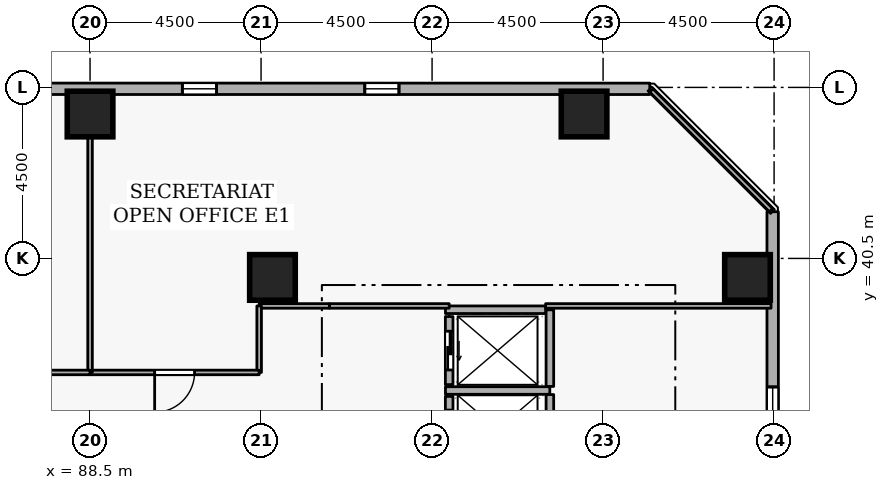
"""IFC4 building model, lengths in metres.
Left out: names, types, materials, properties, quantities, classifications, styles, units other than length and angle.
Written with IfcOpenShell. Run it as: python <this file> out.ifc"""

import sys

from ifc_helpers import new_model, si_unit, direction, frame, frame_2d, origin, origin_2d, place, context, subcontext, project, spatial, rectangle, extrude, element, fill, save


model = new_model("IFC4")
c1 = context("Model", 3, precision=1e-05, world=origin(), true_north=direction((0.0, 1.0)))
c2 = subcontext(c1, "Body", "Model", "MODEL_VIEW")
j1 = project(units=[si_unit("LENGTHUNIT", "METRE"), si_unit("PLANEANGLEUNIT", "RADIAN")], contexts=[c1])
p1 = place(None, origin())
s1 = spatial("IfcSite", under=j1, at=p1, CompositionType="ELEMENT")
p2 = place(p1, origin())
s2 = spatial("IfcBuilding", under=s1, at=p2, CompositionType="ELEMENT")
p3 = place(p2, frame((0.0, 0.0, 108.9)))
s3 = spatial("IfcBuildingStorey", under=s2, at=p3, CompositionType="ELEMENT", Elevation=108.9)
for number, where, z_axis, x_axis in (
    (1, (105.8, 40.0, 0.0), (0.0, 0.0, 1.0), (1.0, 0.0, 0.0)),
    (2, (101.5, 44.3, 0.0), (0.0, 0.0, 1.0), (1.0, 0.0, 0.0)),
    (3, (88.5, 44.3, 0.0), (0.0, 0.0, 1.0), (1.0, 0.0, 0.0)),
    (4, (93.3, 40.0, 0.0), (0.0, 0.0, 1.0), (1.0, 0.0, 0.0)),
):
    element("IfcColumn", number, at=place(p3, frame(where, z_axis=z_axis, x_axis=x_axis)), inside=s3, PredefinedType="COLUMN", context=c2, shape_type="SweptSolid", body=[
        extrude(rectangle(XDim=1.2, YDim=1.2, at=origin_2d()), origin(), (0.0, 0.0, 1.0), 3.6),
    ])
p4 = place(p3, frame((106.465, 5.619, 0.0), z_axis=(0.0, 0.0, 1.0), x_axis=(-5.4088042e-05, 0.999999998537, 0.0)))
e5 = element("IfcWall", 5, at=p4, inside=s3, PredefinedType="STANDARD", context=c2, shape_type="SweptSolid", body=[
    extrude(rectangle(XDim=36.11, YDim=0.3, at=frame_2d((18.055, 0.0))), origin(), (0.0, 0.0, 1.0), 2.7),
])
p5 = place(p4, frame((1.8, 0.0, 0.72)))
e6 = element("IfcOpeningElement", 6, at=p5, cuts=e5, PredefinedType="OPENING", context=c2, shape_type="SweptSolid", body=[
    extrude(rectangle(XDim=0.9, YDim=1.75, at=frame_2d((0.45, 0.875))), frame((0.0, 0.16, 0.0), z_axis=(0.0, -1.0, 0.0), x_axis=(1.0, 0.0, 0.0)), (0.0, 0.0, 1.0), 0.32),
])
p6 = place(p4, frame((11.4, 0.0, 0.72)))
e7 = element("IfcOpeningElement", 7, at=p6, cuts=e5, PredefinedType="OPENING", context=c2, shape_type="SweptSolid", body=[
    extrude(rectangle(XDim=0.9, YDim=1.75, at=frame_2d((0.45, 0.875))), frame((0.0, 0.16, 0.0), z_axis=(0.0, -1.0, 0.0), x_axis=(1.0, 0.0, 0.0)), (0.0, 0.0, 1.0), 0.32),
])
p7 = place(p4, frame((16.2, 0.0, 0.72)))
e8 = element("IfcOpeningElement", 8, at=p7, cuts=e5, PredefinedType="OPENING", context=c2, shape_type="SweptSolid", body=[
    extrude(rectangle(XDim=0.9, YDim=1.75, at=frame_2d((0.45, 0.875))), frame((0.0, 0.16, 0.0), z_axis=(0.0, -1.0, 0.0), x_axis=(1.0, 0.0, 0.0)), (0.0, 0.0, 1.0), 0.32),
])
p8 = place(p4, frame((25.8, 0.0, 0.72)))
e9 = element("IfcOpeningElement", 9, at=p8, cuts=e5, PredefinedType="OPENING", context=c2, shape_type="SweptSolid", body=[
    extrude(rectangle(XDim=0.9, YDim=1.75, at=frame_2d((0.45, 0.875))), frame((0.0, 0.16, 0.0), z_axis=(0.0, -1.0, 0.0), x_axis=(1.0, 0.0, 0.0)), (0.0, 0.0, 1.0), 0.32),
])
p9 = place(p4, frame((30.6, 0.0, 0.72)))
e10 = element("IfcOpeningElement", 10, at=p9, cuts=e5, PredefinedType="OPENING", context=c2, shape_type="SweptSolid", body=[
    extrude(rectangle(XDim=0.9, YDim=1.75, at=frame_2d((0.45, 0.875))), frame((0.0, 0.16, 0.0), z_axis=(0.0, -1.0, 0.0), x_axis=(1.0, 0.0, 0.0)), (0.0, 0.0, 1.0), 0.32),
])
p10 = place(p3, frame((103.229, 44.963, 0.0), z_axis=(0.0, 0.0, 1.0), x_axis=(-0.999999998537, 5.4088042e-05, 0.0)))
e11 = element("IfcWall", 11, at=p10, inside=s3, PredefinedType="STANDARD", context=c2, shape_type="SweptSolid", body=[
    extrude(rectangle(XDim=36.11, YDim=0.3, at=frame_2d((18.055, 0.0))), origin(), (0.0, 0.0, 1.0), 2.7),
])
p11 = place(p10, frame((6.6, 0.0, 0.72)))
e12 = element("IfcOpeningElement", 12, at=p11, cuts=e11, PredefinedType="OPENING", context=c2, shape_type="SweptSolid", body=[
    extrude(rectangle(XDim=0.9, YDim=1.75, at=frame_2d((0.45, 0.875))), frame((0.0, 0.16, 0.0), z_axis=(0.0, -1.0, 0.0), x_axis=(1.0, 0.0, 0.0)), (0.0, 0.0, 1.0), 0.32),
])
p12 = place(p10, frame((11.4, 0.0, 0.72)))
e13 = element("IfcOpeningElement", 13, at=p12, cuts=e11, PredefinedType="OPENING", context=c2, shape_type="SweptSolid", body=[
    extrude(rectangle(XDim=0.9, YDim=1.75, at=frame_2d((0.45, 0.875))), frame((0.0, 0.16, 0.0), z_axis=(0.0, -1.0, 0.0), x_axis=(1.0, 0.0, 0.0)), (0.0, 0.0, 1.0), 0.32),
])
p13 = place(p10, frame((16.2, 0.0, 0.72)))
e14 = element("IfcOpeningElement", 14, at=p13, cuts=e11, PredefinedType="OPENING", context=c2, shape_type="SweptSolid", body=[
    extrude(rectangle(XDim=0.9, YDim=1.75, at=frame_2d((0.45, 0.875))), frame((0.0, 0.16, 0.0), z_axis=(0.0, -1.0, 0.0), x_axis=(1.0, 0.0, 0.0)), (0.0, 0.0, 1.0), 0.32),
])
p14 = place(p10, frame((21.0, 0.0, 0.72)))
e15 = element("IfcOpeningElement", 15, at=p14, cuts=e11, PredefinedType="OPENING", context=c2, shape_type="SweptSolid", body=[
    extrude(rectangle(XDim=0.9, YDim=1.75, at=frame_2d((0.45, 0.875))), frame((0.0, 0.16, 0.0), z_axis=(0.0, -1.0, 0.0), x_axis=(1.0, 0.0, 0.0)), (0.0, 0.0, 1.0), 0.32),
])
p15 = place(p10, frame((30.6, 0.0, 0.72)))
e16 = element("IfcOpeningElement", 16, at=p15, cuts=e11, PredefinedType="OPENING", context=c2, shape_type="SweptSolid", body=[
    extrude(rectangle(XDim=0.9, YDim=1.75, at=frame_2d((0.45, 0.875))), frame((0.0, 0.16, 0.0), z_axis=(0.0, -1.0, 0.0), x_axis=(1.0, 0.0, 0.0)), (0.0, 0.0, 1.0), 0.32),
])
p16 = place(p3, frame((97.95, 36.87, 0.0), z_axis=(0.0, 0.0, 1.0), x_axis=(0.0, -1.0, 0.0)))
e17 = element("IfcWall", 17, at=p16, inside=s3, PredefinedType="STANDARD", context=c2, shape_type="SweptSolid", body=[
    extrude(rectangle(XDim=1.74, YDim=0.2, at=frame_2d((0.87, 0.0))), origin(), (0.0, 0.0, 1.0), 3.34),
])
p17 = place(p16, frame((0.36, 0.0, 0.0)))
e18 = element("IfcOpeningElement", 18, at=p17, cuts=e17, PredefinedType="OPENING", context=c2, shape_type="SweptSolid", body=[
    extrude(rectangle(XDim=1.02, YDim=2.06, at=frame_2d((0.51, 1.03))), frame((0.0, 0.11, 0.0), z_axis=(0.0, -1.0, 0.0), x_axis=(1.0, 0.0, 0.0)), (0.0, 0.0, 1.0), 0.22),
])
p18 = place(p3, frame((97.95, 38.97, 0.0), z_axis=(0.0, 0.0, 1.0), x_axis=(0.0, -1.0, 0.0)))
e19 = element("IfcWall", 19, at=p18, inside=s3, PredefinedType="STANDARD", context=c2, shape_type="SweptSolid", body=[
    extrude(rectangle(XDim=1.79, YDim=0.2, at=frame_2d((0.895, 0.0))), origin(), (0.0, 0.0, 1.0), 3.34),
])
p19 = place(p18, frame((0.385, 0.0, 0.0)))
e20 = element("IfcOpeningElement", 20, at=p19, cuts=e19, PredefinedType="OPENING", context=c2, shape_type="SweptSolid", body=[
    extrude(rectangle(XDim=1.02, YDim=2.06, at=frame_2d((0.51, 1.03))), frame((0.0, 0.11, 0.0), z_axis=(0.0, -1.0, 0.0), x_axis=(1.0, 0.0, 0.0)), (0.0, 0.0, 1.0), 0.22),
])
p20 = place(p3, frame((97.852, 37.025, 0.0), z_axis=(0.0, 0.0, 1.0), x_axis=(1.0, 0.0, 0.0)))
e21 = element("IfcWall", 21, at=p20, inside=s3, PredefinedType="STANDARD", context=c2, shape_type="SweptSolid", body=[
    extrude(rectangle(XDim=2.746, YDim=0.2, at=frame_2d((1.373, 0.0))), origin(), (0.0, 0.0, 1.0), 3.34),
])
p21 = place(p3, frame((100.6, 35.062, 0.0), z_axis=(0.0, 0.0, 1.0), x_axis=(0.0, 1.0, 0.0)))
e22 = element("IfcWall", 22, at=p21, inside=s3, PredefinedType="STANDARD", context=c2, shape_type="SweptSolid", body=[
    extrude(rectangle(XDim=1.856, YDim=0.2, at=frame_2d((0.928, 0.0))), origin(), (0.0, 0.0, 1.0), 3.34),
])
p22 = place(p3, frame((100.6, 37.132, 0.0), z_axis=(0.0, 0.0, 1.0), x_axis=(0.0, 1.0, 0.0)))
e23 = element("IfcWall", 23, at=p22, inside=s3, PredefinedType="STANDARD", context=c2, shape_type="SweptSolid", body=[
    extrude(rectangle(XDim=2.016, YDim=0.2, at=frame_2d((1.008, 0.0))), origin(), (0.0, 0.0, 1.0), 3.34),
])
p23 = place(p3, frame((97.852, 39.15, 0.0), z_axis=(0.0, 0.0, 1.0), x_axis=(1.0, 0.0, 0.0)))
e24 = element("IfcWall", 24, at=p23, inside=s3, PredefinedType="STANDARD", context=c2, shape_type="SweptSolid", body=[
    extrude(rectangle(XDim=2.636, YDim=0.2, at=frame_2d((1.318, 0.0))), origin(), (0.0, 0.0, 1.0), 3.34),
])
p24 = place(p3, frame((106.42, 39.25, 0.0), z_axis=(0.0, 0.0, 1.0), x_axis=(-1.0, 0.0, 0.0)))
e25 = element("IfcWall", 25, at=p24, inside=s3, PredefinedType="PARTITIONING", context=c2, shape_type="SweptSolid", body=[
    extrude(rectangle(XDim=5.932, YDim=0.12, at=frame_2d((2.966, 0.0))), origin(), (0.0, 0.0, 1.0), 3.34),
])
p25 = place(p3, frame((97.95, 39.25, 0.0), z_axis=(0.0, 0.0, 1.0), x_axis=(-1.0, 0.0, 0.0)))
e26 = element("IfcWall", 26, at=p25, inside=s3, PredefinedType="PARTITIONING", context=c2, shape_type="SweptSolid", body=[
    extrude(rectangle(XDim=3.15, YDim=0.12, at=frame_2d((1.575, 0.0))), origin(), (0.0, 0.0, 1.0), 3.34),
])
p26 = place(p3, frame((94.8, 39.25, 0.0), z_axis=(0.0, 0.0, 1.0), x_axis=(-1.0, 0.0, 0.0)))
e27 = element("IfcWall", 27, at=p26, inside=s3, PredefinedType="PARTITIONING", context=c2, shape_type="SweptSolid", body=[
    extrude(rectangle(XDim=1.85, YDim=0.12, at=frame_2d((0.925, 0.0))), origin(), (0.0, 0.0, 1.0), 3.34),
])
p27 = place(p3, frame((92.95, 39.25, 0.0), z_axis=(0.0, 0.0, 1.0), x_axis=(0.0, -1.0, 0.0)))
e28 = element("IfcWall", 28, at=p27, inside=s3, PredefinedType="PARTITIONING", context=c2, shape_type="SweptSolid", body=[
    extrude(rectangle(XDim=1.75, YDim=0.12, at=frame_2d((0.875, 0.0))), origin(), (0.0, 0.0, 1.0), 3.34),
])
p28 = place(p3, frame((92.95, 37.5, 0.0), z_axis=(0.0, 0.0, 1.0), x_axis=(-1.0, 0.0, 0.0)))
e29 = element("IfcWall", 29, at=p28, inside=s3, PredefinedType="PARTITIONING", context=c2, shape_type="SweptSolid", body=[
    extrude(rectangle(XDim=4.45, YDim=0.12, at=frame_2d((2.225, 0.0))), origin(), (0.0, 0.0, 1.0), 3.34),
])
p29 = place(p28, frame((1.7, 0.0, 0.0)))
e30 = element("IfcOpeningElement", 30, at=p29, cuts=e29, PredefinedType="OPENING", context=c2, shape_type="SweptSolid", body=[
    extrude(rectangle(XDim=1.05, YDim=2.1, at=frame_2d((0.525, 1.05))), frame((0.0, 0.07, 0.0), z_axis=(0.0, -1.0, 0.0), x_axis=(1.0, 0.0, 0.0)), (0.0, 0.0, 1.0), 0.14),
])
p30 = place(p3, frame((88.5, 37.5, 0.0), z_axis=(0.0, 0.0, 1.0), x_axis=(0.0, 1.0, 0.0)))
e31 = element("IfcWall", 31, at=p30, inside=s3, PredefinedType="PARTITIONING", context=c2, shape_type="SweptSolid", body=[
    extrude(rectangle(XDim=7.42, YDim=0.12, at=frame_2d((3.71, 0.0))), origin(), (0.0, 0.0, 1.0), 2.882),
])
p31 = place(p3, frame((103.271, 44.92, 0.0), z_axis=(0.0, 0.0, 1.0), x_axis=(0.707106781187, -0.707106781187, 0.0)))
e32 = element("IfcWall", 32, at=p31, inside=s3, PredefinedType="PARTITIONING", context=c2, shape_type="SweptSolid", body=[
    extrude(rectangle(XDim=4.454, YDim=0.12, at=frame_2d((2.227, 0.0))), origin(), (0.0, 0.0, 1.0), 3.34),
])
p32 = place(p3, frame((88.5, 37.5, 0.0), z_axis=(0.0, 0.0, 1.0), x_axis=(-1.0, 0.0, 0.0)))
e33 = element("IfcWall", 33, at=p32, inside=s3, PredefinedType="PARTITIONING", context=c2, shape_type="SweptSolid", body=[
    extrude(rectangle(XDim=3.15, YDim=0.12, at=frame_2d((1.575, 0.0))), origin(), (0.0, 0.0, 1.0), 3.34),
])
p33 = place(p32, frame((1.1, 0.0, 0.0)))
e34 = element("IfcOpeningElement", 34, at=p33, cuts=e33, PredefinedType="OPENING", context=c2, shape_type="SweptSolid", body=[
    extrude(rectangle(XDim=0.95, YDim=2.1, at=frame_2d((0.475, 1.05))), frame((0.0, 0.07, 0.0), z_axis=(0.0, -1.0, 0.0), x_axis=(1.0, 0.0, 0.0)), (0.0, 0.0, 1.0), 0.14),
])
p34 = place(p9, origin())
e35 = element("IfcWindow", 35, at=p34, inside=s3, PartitioningType="SINGLE_PANEL", PredefinedType="WINDOW", context=c2, shape_type="SweptSolid", body=[
    extrude(rectangle(XDim=0.9, YDim=1.75, at=frame_2d((0.45, 0.875))), frame((0.0, 0.03, 0.0), z_axis=(0.0, -1.0, 0.0), x_axis=(1.0, 0.0, 0.0)), (0.0, 0.0, 1.0), 0.06),
])
fill(e10, e35)
p35 = place(p11, origin())
e36 = element("IfcWindow", 36, at=p35, inside=s3, PartitioningType="SINGLE_PANEL", PredefinedType="WINDOW", context=c2, shape_type="SweptSolid", body=[
    extrude(rectangle(XDim=0.9, YDim=1.75, at=frame_2d((0.45, 0.875))), frame((0.0, 0.03, 0.0), z_axis=(0.0, -1.0, 0.0), x_axis=(1.0, 0.0, 0.0)), (0.0, 0.0, 1.0), 0.06),
])
fill(e12, e36)
p36 = place(p12, origin())
e37 = element("IfcWindow", 37, at=p36, inside=s3, PartitioningType="SINGLE_PANEL", PredefinedType="WINDOW", context=c2, shape_type="SweptSolid", body=[
    extrude(rectangle(XDim=0.9, YDim=1.75, at=frame_2d((0.45, 0.875))), frame((0.0, 0.03, 0.0), z_axis=(0.0, -1.0, 0.0), x_axis=(1.0, 0.0, 0.0)), (0.0, 0.0, 1.0), 0.06),
])
fill(e13, e37)
p37 = place(p17, origin())
e38 = element("IfcDoor", 38, at=p37, inside=s3, OperationType="SLIDING_TO_LEFT", PredefinedType="DOOR", context=c2, shape_type="SweptSolid", body=[
    extrude(rectangle(XDim=1.02, YDim=2.06, at=frame_2d((0.51, 1.03))), frame((0.0, 0.025, 0.0), z_axis=(0.0, -1.0, 0.0), x_axis=(1.0, 0.0, 0.0)), (0.0, 0.0, 1.0), 0.05),
])
fill(e18, e38)
p38 = place(p19, origin())
e39 = element("IfcDoor", 39, at=p38, inside=s3, OperationType="SLIDING_TO_LEFT", PredefinedType="DOOR", context=c2, shape_type="SweptSolid", body=[
    extrude(rectangle(XDim=1.02, YDim=2.06, at=frame_2d((0.51, 1.03))), frame((0.0, 0.025, 0.0), z_axis=(0.0, -1.0, 0.0), x_axis=(1.0, 0.0, 0.0)), (0.0, 0.0, 1.0), 0.05),
])
fill(e20, e39)
p39 = place(p29, origin())
e40 = element("IfcDoor", 40, at=p39, inside=s3, OperationType="SINGLE_SWING_RIGHT", PredefinedType="DOOR", context=c2, shape_type="SweptSolid", body=[
    extrude(rectangle(XDim=1.05, YDim=2.1, at=frame_2d((0.525, 1.05))), frame((0.0, 0.025, 0.0), z_axis=(0.0, -1.0, 0.0), x_axis=(1.0, 0.0, 0.0)), (0.0, 0.0, 1.0), 0.05),
])
fill(e30, e40)
save(model, sys.argv[1])
